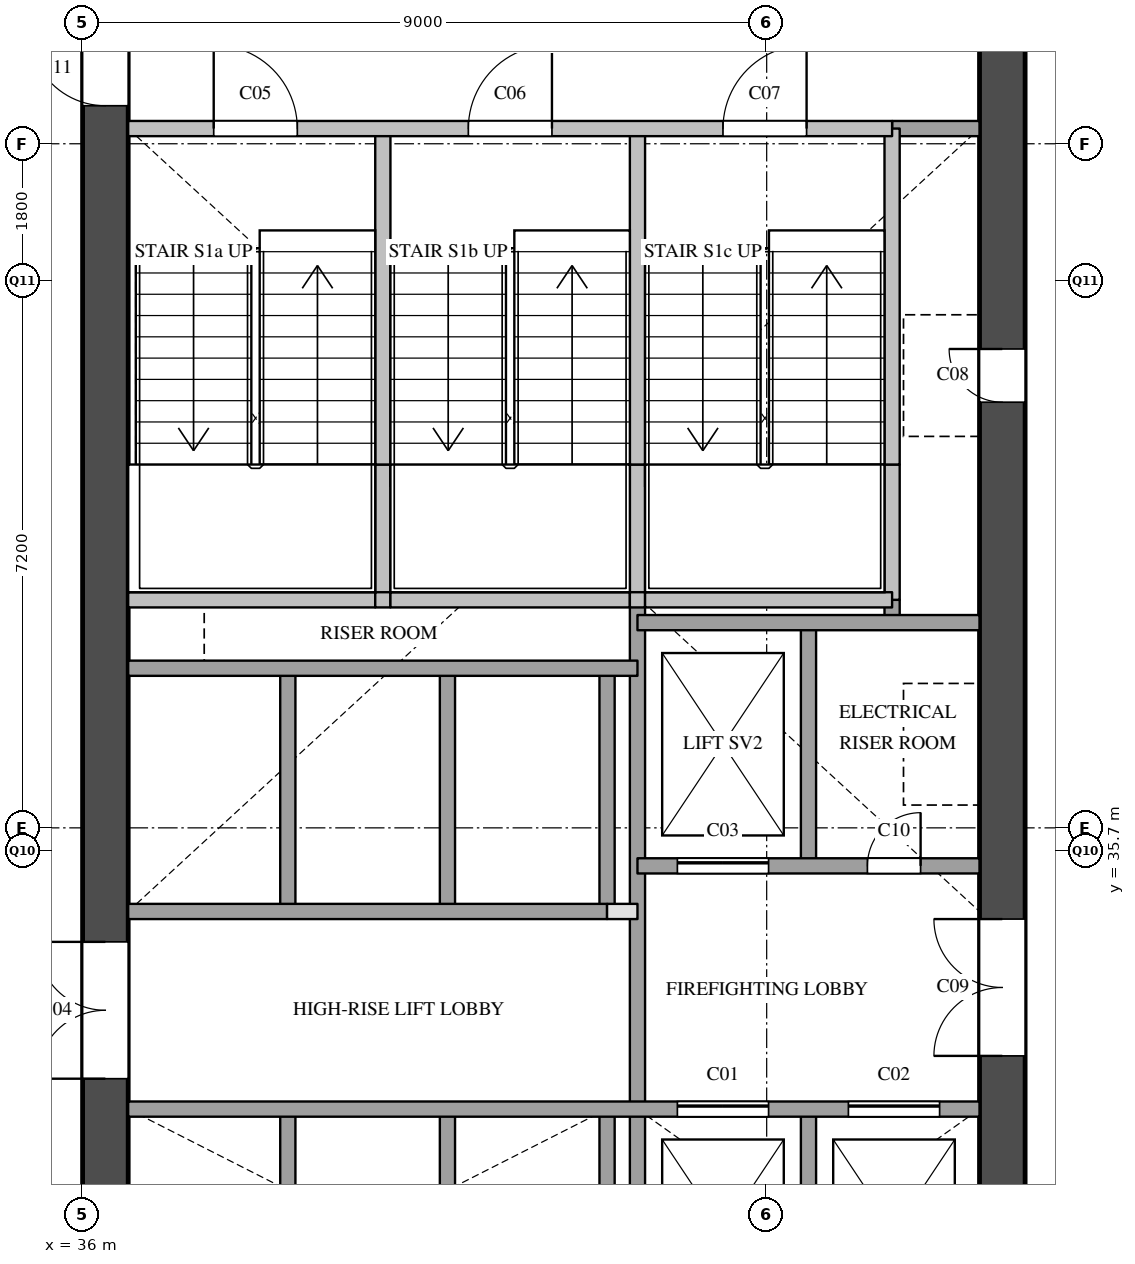
"""IFC4 building model, lengths in metres.
Left out: names, types, materials, properties, quantities, classifications, styles, units other than length and angle.
Written with IfcOpenShell. Run it as: python <this file> out.ifc"""

import sys

from ifc_helpers import new_model, si_unit, direction, frame, frame_2d, origin, place, context, subcontext, project, spatial, rectangle, extrude, element, fill, save


model = new_model("IFC4")
c1 = context("Model", 3, precision=1e-05, world=origin(), true_north=direction((0.0, 1.0)))
c2 = subcontext(c1, "Body", "Model", "MODEL_VIEW")
j1 = project(units=[si_unit("LENGTHUNIT", "METRE"), si_unit("PLANEANGLEUNIT", "RADIAN")], contexts=[c1])
p1 = place(None, origin())
s1 = spatial("IfcSite", under=j1, at=p1, CompositionType="ELEMENT")
p2 = place(p1, origin())
s2 = spatial("IfcBuilding", under=s1, at=p2, CompositionType="ELEMENT")
p3 = place(p2, frame((0.0, 0.0, 115.8)))
s3 = spatial("IfcBuildingStorey", under=s2, at=p3, CompositionType="ELEMENT", Elevation=115.8)
p4 = place(p3, frame((36.3, 29.1, 0.0), z_axis=(0.0, 0.0, 1.0), x_axis=(0.0, 1.0, 0.0)))
e1 = element("IfcWall", 1, at=p4, inside=s3, PredefinedType="SHEAR", context=c2, shape_type="SweptSolid", body=[
    extrude(rectangle(XDim=20.3, YDim=0.6, at=frame_2d((10.15, 0.0))), origin(), (0.0, 0.0, 1.0), 3.5),
])
p5 = place(p4, frame((3.6, 0.0, 0.0)))
e2 = element("IfcOpeningElement", 2, at=p5, cuts=e1, PredefinedType="OPENING", context=c2, shape_type="SweptSolid", body=[
    extrude(rectangle(XDim=1.8, YDim=2.1, at=frame_2d((0.9, 1.05))), frame((0.0, 0.31, 0.0), z_axis=(0.0, -1.0, 0.0), x_axis=(1.0, 0.0, 0.0)), (0.0, 0.0, 1.0), 0.62),
])
p6 = place(p4, frame((16.4, 0.0, 0.0)))
e3 = element("IfcOpeningElement", 3, at=p6, cuts=e1, PredefinedType="OPENING", context=c2, shape_type="SweptSolid", body=[
    extrude(rectangle(XDim=1.0, YDim=2.1, at=frame_2d((0.5, 1.05))), frame((0.0, 0.31, 0.0), z_axis=(0.0, -1.0, 0.0), x_axis=(1.0, 0.0, 0.0)), (0.0, 0.0, 1.0), 0.62),
])
p7 = place(p3, frame((48.1, 29.1, 0.0), z_axis=(0.0, 0.0, 1.0), x_axis=(0.0, 1.0, 0.0)))
e4 = element("IfcWall", 4, at=p7, inside=s3, PredefinedType="SHEAR", context=c2, shape_type="SweptSolid", body=[
    extrude(rectangle(XDim=20.3, YDim=0.6, at=frame_2d((10.15, 0.0))), origin(), (0.0, 0.0, 1.0), 3.5),
])
p8 = place(p7, frame((12.5, 0.0, 0.0)))
e5 = element("IfcOpeningElement", 5, at=p8, cuts=e4, PredefinedType="OPENING", context=c2, shape_type="SweptSolid", body=[
    extrude(rectangle(XDim=0.7, YDim=2.1, at=frame_2d((0.35, 1.05))), frame((0.0, 0.31, 0.0), z_axis=(0.0, -1.0, 0.0), x_axis=(1.0, 0.0, 0.0)), (0.0, 0.0, 1.0), 0.62),
])
p9 = place(p7, frame((3.9, 0.0, 0.0)))
e6 = element("IfcOpeningElement", 6, at=p9, cuts=e4, PredefinedType="OPENING", context=c2, shape_type="SweptSolid", body=[
    extrude(rectangle(XDim=1.8, YDim=2.1, at=frame_2d((0.9, 1.05))), frame((0.0, 0.31, 0.0), z_axis=(0.0, -1.0, 0.0), x_axis=(1.0, 0.0, 0.0)), (0.0, 0.0, 1.0), 0.62),
])
p10 = place(p3, frame((38.7, 29.1, 0.0), z_axis=(0.0, 0.0, 1.0), x_axis=(0.0, 1.0, 0.0)))
e7 = element("IfcWall", 7, at=p10, inside=s3, PredefinedType="SOLIDWALL", context=c2, shape_type="SweptSolid", body=[
    extrude(rectangle(XDim=3.2, YDim=0.2, at=frame_2d((1.6, 0.0))), origin(), (0.0, 0.0, 1.0), 3.5),
])
p11 = place(p3, frame((38.7, 34.9, 0.0), z_axis=(0.0, 0.0, 1.0), x_axis=(0.0, 1.0, 0.0)))
e8 = element("IfcWall", 8, at=p11, inside=s3, PredefinedType="SOLIDWALL", context=c2, shape_type="SweptSolid", body=[
    extrude(rectangle(XDim=3.2, YDim=0.2, at=frame_2d((1.6, 0.0))), origin(), (0.0, 0.0, 1.0), 3.5),
])
p12 = place(p3, frame((39.95, 39.0, 0.0), z_axis=(0.0, 0.0, 1.0), x_axis=(0.0, 1.0, 0.0)))
e9 = element("IfcWall", 9, at=p12, inside=s3, PredefinedType="SOLIDWALL", context=c2, shape_type="SweptSolid", body=[
    extrude(rectangle(XDim=1.78, YDim=0.2, at=frame_2d((0.89, 0.0))), origin(), (0.0, 0.0, 1.0), 3.5),
])
p13 = place(p3, frame((39.95, 40.78, 0.0), z_axis=(0.0, 0.0, 1.0), x_axis=(0.0, 1.0, 0.0)))
e10 = element("IfcWall", 10, at=p13, inside=s3, PredefinedType="SOLIDWALL", context=c2, shape_type="SweptSolid", body=[
    extrude(rectangle(XDim=4.42, YDim=0.2, at=frame_2d((2.21, 0.0))), origin(), (0.0, 0.0, 1.0), 3.5),
])
p14 = place(p3, frame((40.8, 29.1, 0.0), z_axis=(0.0, 0.0, 1.0), x_axis=(0.0, 1.0, 0.0)))
e11 = element("IfcWall", 11, at=p14, inside=s3, PredefinedType="SOLIDWALL", context=c2, shape_type="SweptSolid", body=[
    extrude(rectangle(XDim=3.2, YDim=0.2, at=frame_2d((1.6, 0.0))), origin(), (0.0, 0.0, 1.0), 3.5),
])
p15 = place(p3, frame((40.8, 34.9, 0.0), z_axis=(0.0, 0.0, 1.0), x_axis=(0.0, 1.0, 0.0)))
e12 = element("IfcWall", 12, at=p15, inside=s3, PredefinedType="SOLIDWALL", context=c2, shape_type="SweptSolid", body=[
    extrude(rectangle(XDim=3.2, YDim=0.2, at=frame_2d((1.6, 0.0))), origin(), (0.0, 0.0, 1.0), 3.5),
])
p16 = place(p3, frame((42.9, 29.1, 0.0), z_axis=(0.0, 0.0, 1.0), x_axis=(0.0, 1.0, 0.0)))
e13 = element("IfcWall", 13, at=p16, inside=s3, PredefinedType="SOLIDWALL", context=c2, shape_type="SweptSolid", body=[
    extrude(rectangle(XDim=3.2, YDim=0.2, at=frame_2d((1.6, 0.0))), origin(), (0.0, 0.0, 1.0), 3.5),
])
p17 = place(p3, frame((42.9, 34.9, 0.0), z_axis=(0.0, 0.0, 1.0), x_axis=(0.0, 1.0, 0.0)))
e14 = element("IfcWall", 14, at=p17, inside=s3, PredefinedType="SOLIDWALL", context=c2, shape_type="SweptSolid", body=[
    extrude(rectangle(XDim=3.2, YDim=0.2, at=frame_2d((1.6, 0.0))), origin(), (0.0, 0.0, 1.0), 3.5),
])
p18 = place(p3, frame((43.3, 29.1, 0.0), z_axis=(0.0, 0.0, 1.0), x_axis=(0.0, 1.0, 0.0)))
e15 = element("IfcWall", 15, at=p18, inside=s3, PredefinedType="SOLIDWALL", context=c2, shape_type="SweptSolid", body=[
    extrude(rectangle(XDim=9.9, YDim=0.2, at=frame_2d((4.95, 0.0))), origin(), (0.0, 0.0, 1.0), 3.5),
])
p19 = place(p3, frame((43.3, 39.0, 0.0), z_axis=(0.0, 0.0, 1.0), x_axis=(0.0, 1.0, 0.0)))
e16 = element("IfcWall", 16, at=p19, inside=s3, PredefinedType="SOLIDWALL", context=c2, shape_type="SweptSolid", body=[
    extrude(rectangle(XDim=1.78, YDim=0.2, at=frame_2d((0.89, 0.0))), origin(), (0.0, 0.0, 1.0), 3.5),
])
p20 = place(p3, frame((43.3, 40.78, 0.0), z_axis=(0.0, 0.0, 1.0), x_axis=(0.0, 1.0, 0.0)))
e17 = element("IfcWall", 17, at=p20, inside=s3, PredefinedType="SOLIDWALL", context=c2, shape_type="SweptSolid", body=[
    extrude(rectangle(XDim=4.42, YDim=0.2, at=frame_2d((2.21, 0.0))), origin(), (0.0, 0.0, 1.0), 3.5),
])
for number, where, z_axis, x_axis in (
    (18, (45.55, 29.1, 0.0), (0.0, 0.0, 1.0), (0.0, 1.0, 0.0)),
    (19, (45.55, 35.5, 0.0), (0.0, 0.0, 1.0), (0.0, 1.0, 0.0)),
):
    element("IfcWall", number, at=place(p3, frame(where, z_axis=z_axis, x_axis=x_axis)), inside=s3, PredefinedType="SOLIDWALL", context=c2, shape_type="SweptSolid", body=[
        extrude(rectangle(XDim=3.2, YDim=0.2, at=frame_2d((1.6, 0.0))), origin(), (0.0, 0.0, 1.0), 3.5),
    ])
p21 = place(p3, frame((46.65, 38.7, 0.0), z_axis=(0.0, 0.0, 1.0), x_axis=(0.0, 1.0, 0.0)))
e20 = element("IfcWall", 20, at=p21, inside=s3, PredefinedType="SOLIDWALL", context=c2, shape_type="SweptSolid", body=[
    extrude(rectangle(XDim=0.3, YDim=0.2, at=frame_2d((0.15, 0.0))), origin(), (0.0, 0.0, 1.0), 3.5),
])
p22 = place(p3, frame((46.65, 39.0, 0.0), z_axis=(0.0, 0.0, 1.0), x_axis=(0.0, 1.0, 0.0)))
e21 = element("IfcWall", 21, at=p22, inside=s3, PredefinedType="SOLIDWALL", context=c2, shape_type="SweptSolid", body=[
    extrude(rectangle(XDim=1.78, YDim=0.2, at=frame_2d((0.89, 0.0))), origin(), (0.0, 0.0, 1.0), 3.5),
])
p23 = place(p3, frame((46.65, 40.78, 0.0), z_axis=(0.0, 0.0, 1.0), x_axis=(0.0, 1.0, 0.0)))
e22 = element("IfcWall", 22, at=p23, inside=s3, PredefinedType="SOLIDWALL", context=c2, shape_type="SweptSolid", body=[
    extrude(rectangle(XDim=4.42, YDim=0.2, at=frame_2d((2.21, 0.0))), origin(), (0.0, 0.0, 1.0), 3.5),
])
p24 = place(p3, frame((36.6, 32.3, 0.0), z_axis=(0.0, 0.0, 1.0), x_axis=(1.0, 0.0, 0.0)))
e23 = element("IfcWall", 23, at=p24, inside=s3, PredefinedType="SOLIDWALL", context=c2, shape_type="SweptSolid", body=[
    extrude(rectangle(XDim=11.2, YDim=0.2, at=frame_2d((5.6, 0.0))), origin(), (0.0, 0.0, 1.0), 3.5),
])
p25 = place(p24, frame((7.225, 0.0, 0.0)))
e24 = element("IfcOpeningElement", 24, at=p25, cuts=e23, PredefinedType="OPENING", context=c2, shape_type="SweptSolid", body=[
    extrude(rectangle(XDim=1.2, YDim=2.1, at=frame_2d((0.6, 1.05))), frame((0.0, 0.11, 0.0), z_axis=(0.0, -1.0, 0.0), x_axis=(1.0, 0.0, 0.0)), (0.0, 0.0, 1.0), 0.22),
])
p26 = place(p24, frame((9.475, 0.0, 0.0)))
e25 = element("IfcOpeningElement", 25, at=p26, cuts=e23, PredefinedType="OPENING", context=c2, shape_type="SweptSolid", body=[
    extrude(rectangle(XDim=1.2, YDim=2.1, at=frame_2d((0.6, 1.05))), frame((0.0, 0.11, 0.0), z_axis=(0.0, -1.0, 0.0), x_axis=(1.0, 0.0, 0.0)), (0.0, 0.0, 1.0), 0.22),
])
p27 = place(p3, frame((42.9, 34.9, 0.0), z_axis=(0.0, 0.0, 1.0), x_axis=(1.0, 0.0, 0.0)))
e26 = element("IfcWall", 26, at=p27, inside=s3, PredefinedType="PARTITIONING", context=c2, shape_type="SweptSolid", body=[
    extrude(rectangle(XDim=0.4, YDim=0.2, at=frame_2d((0.2, 0.0))), origin(), (0.0, 0.0, 1.0), 3.5),
])
p28 = place(p3, frame((36.6, 34.9, 0.0), z_axis=(0.0, 0.0, 1.0), x_axis=(1.0, 0.0, 0.0)))
e27 = element("IfcWall", 27, at=p28, inside=s3, PredefinedType="SOLIDWALL", context=c2, shape_type="SweptSolid", body=[
    extrude(rectangle(XDim=6.3, YDim=0.2, at=frame_2d((3.15, 0.0))), origin(), (0.0, 0.0, 1.0), 3.5),
])
p29 = place(p3, frame((43.3, 35.5, 0.0), z_axis=(0.0, 0.0, 1.0), x_axis=(1.0, 0.0, 0.0)))
e28 = element("IfcWall", 28, at=p29, inside=s3, PredefinedType="SOLIDWALL", context=c2, shape_type="SweptSolid", body=[
    extrude(rectangle(XDim=4.5, YDim=0.2, at=frame_2d((2.25, 0.0))), origin(), (0.0, 0.0, 1.0), 3.5),
])
p30 = place(p29, frame((0.525, 0.0, 0.0)))
e29 = element("IfcOpeningElement", 29, at=p30, cuts=e28, PredefinedType="OPENING", context=c2, shape_type="SweptSolid", body=[
    extrude(rectangle(XDim=1.2, YDim=2.1, at=frame_2d((0.6, 1.05))), frame((0.0, 0.11, 0.0), z_axis=(0.0, -1.0, 0.0), x_axis=(1.0, 0.0, 0.0)), (0.0, 0.0, 1.0), 0.22),
])
p31 = place(p29, frame((3.025, 0.0, 0.0)))
e30 = element("IfcOpeningElement", 30, at=p31, cuts=e28, PredefinedType="OPENING", context=c2, shape_type="SweptSolid", body=[
    extrude(rectangle(XDim=0.7, YDim=2.1, at=frame_2d((0.35, 1.05))), frame((0.0, 0.11, 0.0), z_axis=(0.0, -1.0, 0.0), x_axis=(1.0, 0.0, 0.0)), (0.0, 0.0, 1.0), 0.22),
])
p32 = place(p3, frame((36.6, 38.1, 0.0), z_axis=(0.0, 0.0, 1.0), x_axis=(1.0, 0.0, 0.0)))
e31 = element("IfcWall", 31, at=p32, inside=s3, PredefinedType="SOLIDWALL", context=c2, shape_type="SweptSolid", body=[
    extrude(rectangle(XDim=6.7, YDim=0.2, at=frame_2d((3.35, 0.0))), origin(), (0.0, 0.0, 1.0), 3.5),
])
p33 = place(p3, frame((43.3, 38.7, 0.0), z_axis=(0.0, 0.0, 1.0), x_axis=(1.0, 0.0, 0.0)))
e32 = element("IfcWall", 32, at=p33, inside=s3, PredefinedType="SOLIDWALL", context=c2, shape_type="SweptSolid", body=[
    extrude(rectangle(XDim=4.5, YDim=0.2, at=frame_2d((2.25, 0.0))), origin(), (0.0, 0.0, 1.0), 3.5),
])
p34 = place(p3, frame((36.6, 39.0, 0.0), z_axis=(0.0, 0.0, 1.0), x_axis=(1.0, 0.0, 0.0)))
e33 = element("IfcWall", 33, at=p34, inside=s3, PredefinedType="SOLIDWALL", context=c2, shape_type="SweptSolid", body=[
    extrude(rectangle(XDim=3.25, YDim=0.2, at=frame_2d((1.625, 0.0))), origin(), (0.0, 0.0, 1.0), 3.5),
])
p35 = place(p3, frame((39.85, 39.0, 0.0), z_axis=(0.0, 0.0, 1.0), x_axis=(1.0, 0.0, 0.0)))
e34 = element("IfcWall", 34, at=p35, inside=s3, PredefinedType="SOLIDWALL", context=c2, shape_type="SweptSolid", body=[
    extrude(rectangle(XDim=0.2, YDim=0.2, at=frame_2d((0.1, 0.0))), origin(), (0.0, 0.0, 1.0), 3.5),
])
p36 = place(p3, frame((40.05, 39.0, 0.0), z_axis=(0.0, 0.0, 1.0), x_axis=(1.0, 0.0, 0.0)))
e35 = element("IfcWall", 35, at=p36, inside=s3, PredefinedType="SOLIDWALL", context=c2, shape_type="SweptSolid", body=[
    extrude(rectangle(XDim=3.15, YDim=0.2, at=frame_2d((1.575, 0.0))), origin(), (0.0, 0.0, 1.0), 3.5),
])
p37 = place(p3, frame((43.2, 39.0, 0.0), z_axis=(0.0, 0.0, 1.0), x_axis=(1.0, 0.0, 0.0)))
e36 = element("IfcWall", 36, at=p37, inside=s3, PredefinedType="SOLIDWALL", context=c2, shape_type="SweptSolid", body=[
    extrude(rectangle(XDim=0.2, YDim=0.2, at=frame_2d((0.1, 0.0))), origin(), (0.0, 0.0, 1.0), 3.5),
])
p38 = place(p3, frame((43.4, 39.0, 0.0), z_axis=(0.0, 0.0, 1.0), x_axis=(1.0, 0.0, 0.0)))
e37 = element("IfcWall", 37, at=p38, inside=s3, PredefinedType="SOLIDWALL", context=c2, shape_type="SweptSolid", body=[
    extrude(rectangle(XDim=3.25, YDim=0.2, at=frame_2d((1.625, 0.0))), origin(), (0.0, 0.0, 1.0), 3.5),
])
p39 = place(p3, frame((46.65, 45.2, 0.0), z_axis=(0.0, 0.0, 1.0), x_axis=(1.0, 0.0, 0.0)))
e38 = element("IfcWall", 38, at=p39, inside=s3, PredefinedType="SOLIDWALL", context=c2, shape_type="SweptSolid", body=[
    extrude(rectangle(XDim=1.15, YDim=0.2, at=frame_2d((0.575, 0.0))), origin(), (0.0, 0.0, 1.0), 3.5),
])
p40 = place(p3, frame((36.6, 45.2, 0.0), z_axis=(0.0, 0.0, 1.0), x_axis=(1.0, 0.0, 0.0)))
e39 = element("IfcWall", 39, at=p40, inside=s3, PredefinedType="SOLIDWALL", context=c2, shape_type="SweptSolid", body=[
    extrude(rectangle(XDim=10.05, YDim=0.2, at=frame_2d((5.025, 0.0))), origin(), (0.0, 0.0, 1.0), 3.5),
])
p41 = place(p40, frame((1.125, 0.0, 0.0)))
e40 = element("IfcOpeningElement", 40, at=p41, cuts=e39, PredefinedType="OPENING", context=c2, shape_type="SweptSolid", body=[
    extrude(rectangle(XDim=1.1, YDim=2.1, at=frame_2d((0.55, 1.05))), frame((0.0, 0.11, 0.0), z_axis=(0.0, -1.0, 0.0), x_axis=(1.0, 0.0, 0.0)), (0.0, 0.0, 1.0), 0.22),
])
p42 = place(p40, frame((4.475, 0.0, 0.0)))
e41 = element("IfcOpeningElement", 41, at=p42, cuts=e39, PredefinedType="OPENING", context=c2, shape_type="SweptSolid", body=[
    extrude(rectangle(XDim=1.1, YDim=2.1, at=frame_2d((0.55, 1.05))), frame((0.0, 0.11, 0.0), z_axis=(0.0, -1.0, 0.0), x_axis=(1.0, 0.0, 0.0)), (0.0, 0.0, 1.0), 0.22),
])
p43 = place(p40, frame((7.825, 0.0, 0.0)))
e42 = element("IfcOpeningElement", 42, at=p43, cuts=e39, PredefinedType="OPENING", context=c2, shape_type="SweptSolid", body=[
    extrude(rectangle(XDim=1.1, YDim=2.1, at=frame_2d((0.55, 1.05))), frame((0.0, 0.11, 0.0), z_axis=(0.0, -1.0, 0.0), x_axis=(1.0, 0.0, 0.0)), (0.0, 0.0, 1.0), 0.22),
])
p44 = place(p25, origin())
e43 = element("IfcDoor", 43, at=p44, inside=s3, OperationType="SLIDING_TO_LEFT", PredefinedType="DOOR", context=c2, shape_type="SweptSolid", body=[
    extrude(rectangle(XDim=1.2, YDim=2.1, at=frame_2d((0.6, 1.05))), frame((0.0, 0.025, 0.0), z_axis=(0.0, -1.0, 0.0), x_axis=(1.0, 0.0, 0.0)), (0.0, 0.0, 1.0), 0.05),
])
fill(e24, e43)
p45 = place(p26, origin())
e44 = element("IfcDoor", 44, at=p45, inside=s3, OperationType="SLIDING_TO_LEFT", PredefinedType="DOOR", context=c2, shape_type="SweptSolid", body=[
    extrude(rectangle(XDim=1.2, YDim=2.1, at=frame_2d((0.6, 1.05))), frame((0.0, 0.025, 0.0), z_axis=(0.0, -1.0, 0.0), x_axis=(1.0, 0.0, 0.0)), (0.0, 0.0, 1.0), 0.05),
])
fill(e25, e44)
p46 = place(p30, origin())
e45 = element("IfcDoor", 45, at=p46, inside=s3, OperationType="SLIDING_TO_LEFT", PredefinedType="DOOR", context=c2, shape_type="SweptSolid", body=[
    extrude(rectangle(XDim=1.2, YDim=2.1, at=frame_2d((0.6, 1.05))), frame((0.0, 0.025, 0.0), z_axis=(0.0, -1.0, 0.0), x_axis=(1.0, 0.0, 0.0)), (0.0, 0.0, 1.0), 0.05),
])
fill(e29, e45)
p47 = place(p5, origin())
e46 = element("IfcDoor", 46, at=p47, inside=s3, OperationType="DOUBLE_DOOR_SINGLE_SWING", PredefinedType="DOOR", context=c2, shape_type="SweptSolid", body=[
    extrude(rectangle(XDim=1.8, YDim=2.1, at=frame_2d((0.9, 1.05))), frame((0.0, 0.025, 0.0), z_axis=(0.0, -1.0, 0.0), x_axis=(1.0, 0.0, 0.0)), (0.0, 0.0, 1.0), 0.05),
])
fill(e2, e46)
p48 = place(p41, origin())
e47 = element("IfcDoor", 47, at=p48, inside=s3, OperationType="SINGLE_SWING_LEFT", PredefinedType="DOOR", context=c2, shape_type="SweptSolid", body=[
    extrude(rectangle(XDim=1.1, YDim=2.1, at=frame_2d((0.55, 1.05))), frame((0.0, 0.025, 0.0), z_axis=(0.0, -1.0, 0.0), x_axis=(1.0, 0.0, 0.0)), (0.0, 0.0, 1.0), 0.05),
])
fill(e40, e47)
p49 = place(p42, origin())
e48 = element("IfcDoor", 48, at=p49, inside=s3, OperationType="SINGLE_SWING_RIGHT", PredefinedType="DOOR", context=c2, shape_type="SweptSolid", body=[
    extrude(rectangle(XDim=1.1, YDim=2.1, at=frame_2d((0.55, 1.05))), frame((0.0, 0.025, 0.0), z_axis=(0.0, -1.0, 0.0), x_axis=(1.0, 0.0, 0.0)), (0.0, 0.0, 1.0), 0.05),
])
fill(e41, e48)
p50 = place(p43, origin())
e49 = element("IfcDoor", 49, at=p50, inside=s3, OperationType="SINGLE_SWING_RIGHT", PredefinedType="DOOR", context=c2, shape_type="SweptSolid", body=[
    extrude(rectangle(XDim=1.1, YDim=2.1, at=frame_2d((0.55, 1.05))), frame((0.0, 0.025, 0.0), z_axis=(0.0, -1.0, 0.0), x_axis=(1.0, 0.0, 0.0)), (0.0, 0.0, 1.0), 0.05),
])
fill(e42, e49)
p51 = place(p8, origin())
e50 = element("IfcDoor", 50, at=p51, inside=s3, OperationType="SINGLE_SWING_RIGHT", PredefinedType="DOOR", context=c2, shape_type="SweptSolid", body=[
    extrude(rectangle(XDim=0.7, YDim=2.1, at=frame_2d((0.35, 1.05))), frame((0.0, 0.025, 0.0), z_axis=(0.0, -1.0, 0.0), x_axis=(1.0, 0.0, 0.0)), (0.0, 0.0, 1.0), 0.05),
])
fill(e5, e50)
p52 = place(p9, origin())
e51 = element("IfcDoor", 51, at=p52, inside=s3, OperationType="DOUBLE_DOOR_SINGLE_SWING", PredefinedType="DOOR", context=c2, shape_type="SweptSolid", body=[
    extrude(rectangle(XDim=1.8, YDim=2.1, at=frame_2d((0.9, 1.05))), frame((0.0, 0.025, 0.0), z_axis=(0.0, -1.0, 0.0), x_axis=(1.0, 0.0, 0.0)), (0.0, 0.0, 1.0), 0.05),
])
fill(e6, e51)
p53 = place(p31, origin())
e52 = element("IfcDoor", 52, at=p53, inside=s3, OperationType="SINGLE_SWING_RIGHT", PredefinedType="DOOR", context=c2, shape_type="SweptSolid", body=[
    extrude(rectangle(XDim=0.7, YDim=2.1, at=frame_2d((0.35, 1.05))), frame((0.0, 0.025, 0.0), z_axis=(0.0, -1.0, 0.0), x_axis=(1.0, 0.0, 0.0)), (0.0, 0.0, 1.0), 0.05),
])
fill(e30, e52)
p54 = place(p6, origin())
e53 = element("IfcDoor", 53, at=p54, inside=s3, OperationType="SINGLE_SWING_RIGHT", PredefinedType="DOOR", context=c2, shape_type="SweptSolid", body=[
    extrude(rectangle(XDim=1.0, YDim=2.1, at=frame_2d((0.5, 1.05))), frame((0.0, 0.025, 0.0), z_axis=(0.0, -1.0, 0.0), x_axis=(1.0, 0.0, 0.0)), (0.0, 0.0, 1.0), 0.05),
])
fill(e3, e53)
save(model, sys.argv[1])
